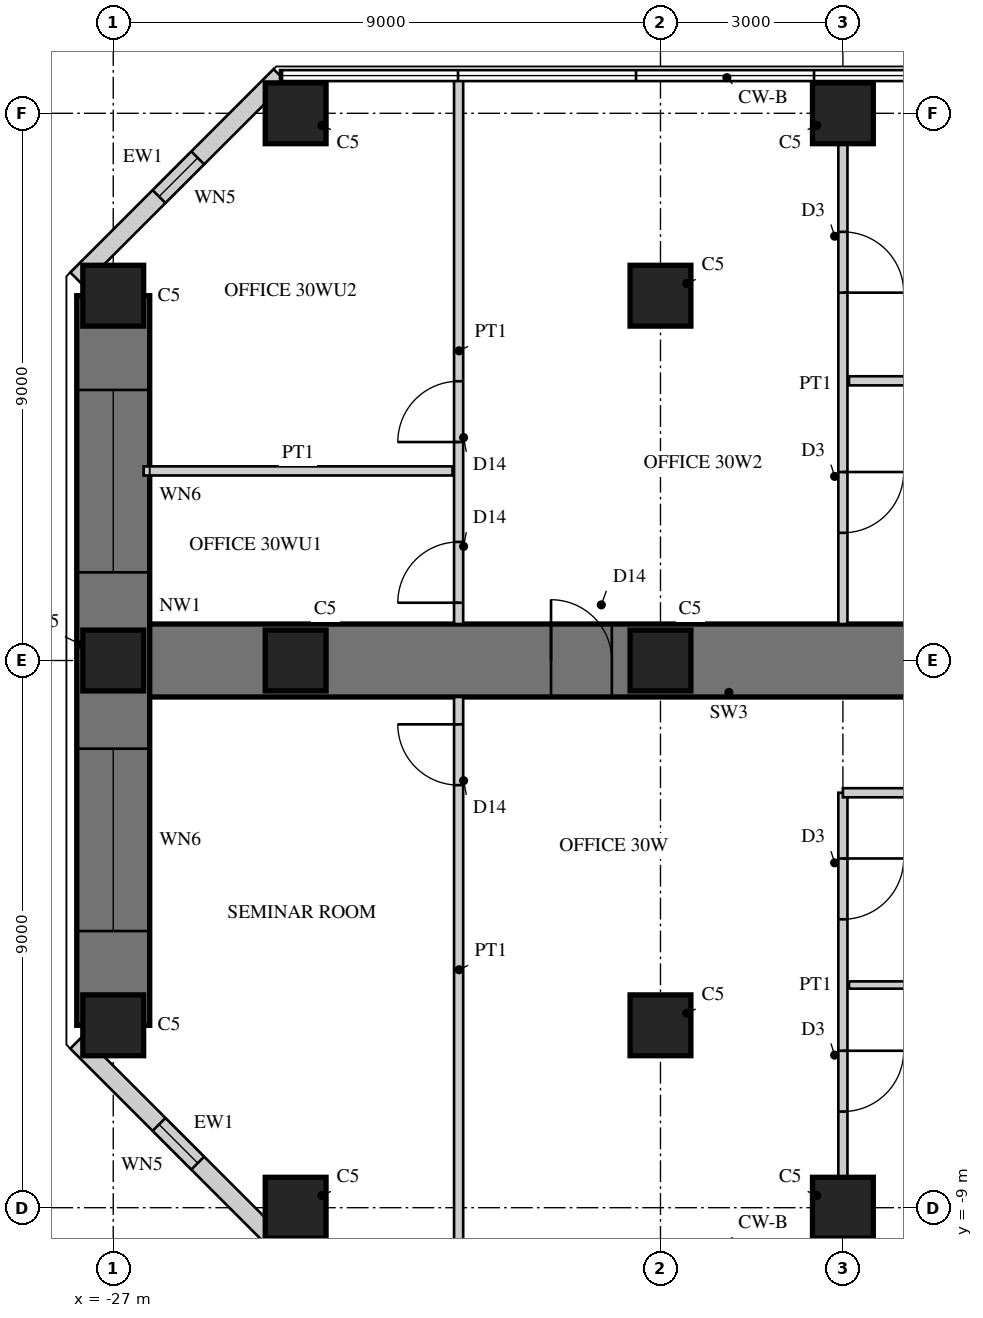
"""IFC4 building model, lengths in metres.
Left out: names, types, materials, properties, quantities, classifications, styles, units other than length and angle.
Written with IfcOpenShell. Run it as: python <this file> out.ifc"""

import sys

from ifc_helpers import new_model, si_unit, direction, frame, frame_2d, origin, origin_2d, place, context, subcontext, project, spatial, rectangle, hollow_rectangle, extrude, element, fill, save


model = new_model("IFC4")
c1 = context("Model", 3, precision=1e-05, world=origin(), true_north=direction((0.0, 1.0)))
c2 = subcontext(c1, "Body", "Model", "MODEL_VIEW")
j1 = project(units=[si_unit("LENGTHUNIT", "METRE"), si_unit("PLANEANGLEUNIT", "RADIAN")], contexts=[c1])
p1 = place(None, origin())
s1 = spatial("IfcSite", under=j1, at=p1, CompositionType="ELEMENT")
p2 = place(p1, origin())
s2 = spatial("IfcBuilding", under=s1, at=p2, CompositionType="ELEMENT")
p3 = place(p2, frame((0.0, 0.0, 124.5)))
s3 = spatial("IfcBuildingStorey", under=s2, at=p3, CompositionType="ELEMENT", Elevation=124.5)
p4 = place(p3, frame((-9.0, 0.0, 0.0), z_axis=(0.0, 0.0, 1.0), x_axis=(-1.0, 0.0, 0.0)))
e1 = element("IfcWall", 1, at=p4, inside=s3, PredefinedType="SHEAR", context=c2, shape_type="SweptSolid", body=[
    extrude(rectangle(XDim=18.0, YDim=1.2, at=frame_2d((9.0, 0.0))), origin(), (0.0, 0.0, 1.0), 4.0),
])
p5 = place(p4, frame((9.8, 0.0, 0.0)))
e2 = element("IfcOpeningElement", 2, at=p5, cuts=e1, PredefinedType="OPENING", context=c2, shape_type="SweptSolid", body=[
    extrude(rectangle(XDim=1.0, YDim=2.2, at=frame_2d((0.5, 1.1))), frame((0.0, 0.61, 0.0), z_axis=(0.0, -1.0, 0.0), x_axis=(1.0, 0.0, 0.0)), (0.0, 0.0, 1.0), 1.22),
])
p6 = place(p3, frame((-27.0, 6.0, 0.0), z_axis=(0.0, 0.0, 1.0), x_axis=(0.0, -1.0, 0.0)))
e3 = element("IfcWall", 3, at=p6, inside=s3, PredefinedType="SHEAR", context=c2, shape_type="SweptSolid", body=[
    extrude(rectangle(XDim=12.0, YDim=1.2, at=frame_2d((6.0, 0.0))), origin(), (0.0, 0.0, 1.0), 4.0),
])
p7 = place(p6, frame((1.55, 0.0, 0.6)))
e4 = element("IfcOpeningElement", 4, at=p7, cuts=e3, PredefinedType="OPENING", context=c2, shape_type="SweptSolid", body=[
    extrude(rectangle(XDim=3.0, YDim=2.4, at=frame_2d((1.5, 1.2))), frame((0.0, 0.61, 0.0), z_axis=(0.0, -1.0, 0.0), x_axis=(1.0, 0.0, 0.0)), (0.0, 0.0, 1.0), 1.22),
])
p8 = place(p6, frame((7.45, 0.0, 0.6)))
e5 = element("IfcOpeningElement", 5, at=p8, cuts=e3, PredefinedType="OPENING", context=c2, shape_type="SweptSolid", body=[
    extrude(rectangle(XDim=3.0, YDim=2.4, at=frame_2d((1.5, 1.2))), frame((0.0, 0.61, 0.0), z_axis=(0.0, -1.0, 0.0), x_axis=(1.0, 0.0, 0.0)), (0.0, 0.0, 1.0), 1.22),
])
for number, where, z_axis, x_axis in (
    (6, (-15.0, 9.0, 0.0), (0.0, 0.0, 1.0), (1.0, 0.0, 0.0)),
    (7, (-24.0, 9.0, 0.0), (0.0, 0.0, 1.0), (1.0, 0.0, 0.0)),
    (8, (-15.0, -9.0, 0.0), (0.0, 0.0, 1.0), (1.0, 0.0, 0.0)),
    (9, (-24.0, -9.0, 0.0), (0.0, 0.0, 1.0), (1.0, 0.0, 0.0)),
    (10, (-27.0, 6.0, 0.0), (0.0, 0.0, 1.0), (1.0, 0.0, 0.0)),
    (11, (-27.0, 0.0, 0.0), (0.0, 0.0, 1.0), (1.0, 0.0, 0.0)),
    (12, (-27.0, -6.0, 0.0), (0.0, 0.0, 1.0), (1.0, 0.0, 0.0)),
    (13, (-18.0, 6.0, 0.0), (0.0, 0.0, 1.0), (1.0, 0.0, 0.0)),
    (14, (-18.0, 0.0, 0.0), (0.0, 0.0, 1.0), (1.0, 0.0, 0.0)),
    (15, (-18.0, -6.0, 0.0), (0.0, 0.0, 1.0), (1.0, 0.0, 0.0)),
    (16, (-24.0, 0.0, 0.0), (0.0, 0.0, 1.0), (1.0, 0.0, 0.0)),
):
    element("IfcColumn", number, at=place(p3, frame(where, z_axis=z_axis, x_axis=x_axis)), inside=s3, PredefinedType="COLUMN", context=c2, shape_type="SweptSolid", body=[
        extrude(rectangle(XDim=1.0, YDim=1.0, at=origin_2d()), origin(), (0.0, 0.0, 1.0), 4.0),
    ])
p9 = place(p3, frame((-24.257, 9.62, 0.0), z_axis=(0.0, 0.0, 1.0), x_axis=(-0.707106781187, -0.707106781187, 0.0)))
e17 = element("IfcWall", 17, at=p9, inside=s3, PredefinedType="SOLIDWALL", context=c2, shape_type="SweptSolid", body=[
    extrude(rectangle(XDim=4.728, YDim=0.3, at=frame_2d((2.364, 0.0))), origin(), (0.0, 0.0, 1.0), 3.8),
])
p10 = place(p9, frame((1.914, 0.0, 0.3)))
e18 = element("IfcOpeningElement", 18, at=p10, cuts=e17, PredefinedType="OPENING", context=c2, shape_type="SweptSolid", body=[
    extrude(rectangle(XDim=0.9, YDim=2.4, at=frame_2d((0.45, 1.2))), frame((0.0, 0.16, 0.0), z_axis=(0.0, -1.0, 0.0), x_axis=(1.0, 0.0, 0.0)), (0.0, 0.0, 1.0), 0.32),
])
p11 = place(p3, frame((-27.6, -6.277, 0.0), z_axis=(0.0, 0.0, 1.0), x_axis=(0.707106781187, -0.707106781187, 0.0)))
e19 = element("IfcWall", 19, at=p11, inside=s3, PredefinedType="SOLIDWALL", context=c2, shape_type="SweptSolid", body=[
    extrude(rectangle(XDim=4.728, YDim=0.3, at=frame_2d((2.364, 0.0))), origin(), (0.0, 0.0, 1.0), 3.8),
])
p12 = place(p11, frame((1.914, 0.0, 0.3)))
e20 = element("IfcOpeningElement", 20, at=p12, cuts=e19, PredefinedType="OPENING", context=c2, shape_type="SweptSolid", body=[
    extrude(rectangle(XDim=0.9, YDim=2.4, at=frame_2d((0.45, 1.2))), frame((0.0, 0.16, 0.0), z_axis=(0.0, -1.0, 0.0), x_axis=(1.0, 0.0, 0.0)), (0.0, 0.0, 1.0), 0.32),
])
p13 = place(p3, frame((-15.0, -2.175, 0.0), z_axis=(0.0, 0.0, 1.0), x_axis=(0.0, -1.0, 0.0)))
e21 = element("IfcWall", 21, at=p13, inside=s3, PredefinedType="PARTITIONING", context=c2, shape_type="SweptSolid", body=[
    extrude(rectangle(XDim=6.325, YDim=0.15, at=frame_2d((3.163, 0.0))), origin(), (0.0, 0.0, 1.0), 3.0),
])
p14 = place(p13, frame((1.081, 0.0, 0.0)))
e22 = element("IfcOpeningElement", 22, at=p14, cuts=e21, PredefinedType="OPENING", context=c2, shape_type="SweptSolid", body=[
    extrude(rectangle(XDim=1.0, YDim=2.1, at=frame_2d((0.5, 1.05))), frame((0.0, 0.085, 0.0), z_axis=(0.0, -1.0, 0.0), x_axis=(1.0, 0.0, 0.0)), (0.0, 0.0, 1.0), 0.17),
])
p15 = place(p13, frame((4.244, 0.0, 0.0)))
e23 = element("IfcOpeningElement", 23, at=p15, cuts=e21, PredefinedType="OPENING", context=c2, shape_type="SweptSolid", body=[
    extrude(rectangle(XDim=1.0, YDim=2.1, at=frame_2d((0.5, 1.05))), frame((0.0, 0.085, 0.0), z_axis=(0.0, -1.0, 0.0), x_axis=(1.0, 0.0, 0.0)), (0.0, 0.0, 1.0), 0.17),
])
p16 = place(p3, frame((-9.65, -2.175, 0.0), z_axis=(0.0, 0.0, 1.0), x_axis=(-1.0, 0.0, 0.0)))
e24 = element("IfcWall", 24, at=p16, inside=s3, PredefinedType="PARTITIONING", context=c2, shape_type="SweptSolid", body=[
    extrude(rectangle(XDim=5.35, YDim=0.15, at=frame_2d((2.675, 0.0))), origin(), (0.0, 0.0, 1.0), 3.8),
])
p17 = place(p3, frame((-9.65, -5.337, 0.0), z_axis=(0.0, 0.0, 1.0), x_axis=(-1.0, 0.0, 0.0)))
e25 = element("IfcWall", 25, at=p17, inside=s3, PredefinedType="PLUMBINGWALL", context=c2, shape_type="SweptSolid", body=[
    extrude(rectangle(XDim=5.25, YDim=0.12, at=frame_2d((2.625, 0.0))), origin(), (0.0, 0.0, 1.0), 3.8),
])
p18 = place(p3, frame((-15.0, 8.5, 0.0), z_axis=(0.0, 0.0, 1.0), x_axis=(0.0, -1.0, 0.0)))
e26 = element("IfcWall", 26, at=p18, inside=s3, PredefinedType="PARTITIONING", context=c2, shape_type="SweptSolid", body=[
    extrude(rectangle(XDim=7.9, YDim=0.15, at=frame_2d((3.95, 0.0))), origin(), (0.0, 0.0, 1.0), 3.0),
])
p19 = place(p18, frame((1.45, 0.0, 0.0)))
e27 = element("IfcOpeningElement", 27, at=p19, cuts=e26, PredefinedType="OPENING", context=c2, shape_type="SweptSolid", body=[
    extrude(rectangle(XDim=1.0, YDim=2.1, at=frame_2d((0.5, 1.05))), frame((0.0, 0.085, 0.0), z_axis=(0.0, -1.0, 0.0), x_axis=(1.0, 0.0, 0.0)), (0.0, 0.0, 1.0), 0.17),
])
p20 = place(p18, frame((5.4, 0.0, 0.0)))
e28 = element("IfcOpeningElement", 28, at=p20, cuts=e26, PredefinedType="OPENING", context=c2, shape_type="SweptSolid", body=[
    extrude(rectangle(XDim=1.0, YDim=2.1, at=frame_2d((0.5, 1.05))), frame((0.0, 0.085, 0.0), z_axis=(0.0, -1.0, 0.0), x_axis=(1.0, 0.0, 0.0)), (0.0, 0.0, 1.0), 0.17),
])
p21 = place(p3, frame((-9.65, 4.6, 0.0), z_axis=(0.0, 0.0, 1.0), x_axis=(-1.0, 0.0, 0.0)))
e29 = element("IfcWall", 29, at=p21, inside=s3, PredefinedType="PARTITIONING", context=c2, shape_type="SweptSolid", body=[
    extrude(rectangle(XDim=5.25, YDim=0.15, at=frame_2d((2.625, 0.0))), origin(), (0.0, 0.0, 1.0), 3.8),
])
p22 = place(p3, frame((-21.32, -0.6, 0.0), z_axis=(0.0, 0.0, 1.0), x_axis=(0.0, -1.0, 0.0)))
e30 = element("IfcWall", 30, at=p22, inside=s3, PredefinedType="PARTITIONING", context=c2, shape_type="SweptSolid", body=[
    extrude(rectangle(XDim=8.98, YDim=0.15, at=frame_2d((4.49, 0.0))), origin(), (0.0, 0.0, 1.0), 3.8),
])
p23 = place(p22, frame((0.45, 0.0, 0.0)))
e31 = element("IfcOpeningElement", 31, at=p23, cuts=e30, PredefinedType="OPENING", context=c2, shape_type="SweptSolid", body=[
    extrude(rectangle(XDim=1.0, YDim=2.2, at=frame_2d((0.5, 1.1))), frame((0.0, 0.085, 0.0), z_axis=(0.0, -1.0, 0.0), x_axis=(1.0, 0.0, 0.0)), (0.0, 0.0, 1.0), 0.17),
])
p24 = place(p3, frame((-21.42, 3.118, 0.0), z_axis=(0.0, 0.0, 1.0), x_axis=(-1.0, 0.0, 0.0)))
e32 = element("IfcWall", 32, at=p24, inside=s3, PredefinedType="PARTITIONING", context=c2, shape_type="SweptSolid", body=[
    extrude(rectangle(XDim=5.08, YDim=0.15, at=frame_2d((2.54, 0.0))), origin(), (0.0, 0.0, 1.0), 3.8),
])
p25 = place(p3, frame((-21.32, 9.58, 0.0), z_axis=(0.0, 0.0, 1.0), x_axis=(0.0, -1.0, 0.0)))
e33 = element("IfcWall", 33, at=p25, inside=s3, PredefinedType="PARTITIONING", context=c2, shape_type="SweptSolid", body=[
    extrude(rectangle(XDim=8.98, YDim=0.15, at=frame_2d((4.49, 0.0))), origin(), (0.0, 0.0, 1.0), 3.8),
])
p26 = place(p25, frame((4.987, 0.0, 0.0)))
e34 = element("IfcOpeningElement", 34, at=p26, cuts=e33, PredefinedType="OPENING", context=c2, shape_type="SweptSolid", body=[
    extrude(rectangle(XDim=1.0, YDim=2.2, at=frame_2d((0.5, 1.1))), frame((0.0, 0.085, 0.0), z_axis=(0.0, -1.0, 0.0), x_axis=(1.0, 0.0, 0.0)), (0.0, 0.0, 1.0), 0.17),
])
p27 = place(p25, frame((7.63, 0.0, 0.0)))
e35 = element("IfcOpeningElement", 35, at=p27, cuts=e33, PredefinedType="OPENING", context=c2, shape_type="SweptSolid", body=[
    extrude(rectangle(XDim=1.0, YDim=2.2, at=frame_2d((0.5, 1.1))), frame((0.0, 0.085, 0.0), z_axis=(0.0, -1.0, 0.0), x_axis=(1.0, 0.0, 0.0)), (0.0, 0.0, 1.0), 0.17),
])
p28 = place(p10, origin())
e36 = element("IfcWindow", 36, at=p28, inside=s3, PartitioningType="SINGLE_PANEL", PredefinedType="WINDOW", context=c2, shape_type="SweptSolid", body=[
    extrude(hollow_rectangle(XDim=0.9, YDim=2.4, WallThickness=0.06, at=frame_2d((0.45, 1.2))), frame((0.0, 0.03, 0.0), z_axis=(0.0, -1.0, 0.0), x_axis=(1.0, 0.0, 0.0)), (0.0, 0.0, 1.0), 0.06),
    extrude(rectangle(XDim=0.779, YDim=2.279, at=frame_2d((0.45, 1.2))), frame((0.0, 0.03, 0.0), z_axis=(0.0, -1.0, 0.0), x_axis=(1.0, 0.0, 0.0)), (0.0, 0.0, 1.0), 0.06),
])
fill(e18, e36)
p29 = place(p7, origin())
e37 = element("IfcWindow", 37, at=p29, inside=s3, PartitioningType="SINGLE_PANEL", PredefinedType="WINDOW", context=c2, shape_type="SweptSolid", body=[
    extrude(hollow_rectangle(XDim=3.0, YDim=2.4, WallThickness=0.06, at=frame_2d((1.5, 1.2))), frame((0.0, 0.03, 0.0), z_axis=(0.0, -1.0, 0.0), x_axis=(1.0, 0.0, 0.0)), (0.0, 0.0, 1.0), 0.06),
    extrude(rectangle(XDim=2.879, YDim=2.279, at=frame_2d((1.5, 1.2))), frame((0.0, 0.03, 0.0), z_axis=(0.0, -1.0, 0.0), x_axis=(1.0, 0.0, 0.0)), (0.0, 0.0, 1.0), 0.06),
])
fill(e4, e37)
p30 = place(p8, origin())
e38 = element("IfcWindow", 38, at=p30, inside=s3, PartitioningType="SINGLE_PANEL", PredefinedType="WINDOW", context=c2, shape_type="SweptSolid", body=[
    extrude(hollow_rectangle(XDim=3.0, YDim=2.4, WallThickness=0.06, at=frame_2d((1.5, 1.2))), frame((0.0, 0.03, 0.0), z_axis=(0.0, -1.0, 0.0), x_axis=(1.0, 0.0, 0.0)), (0.0, 0.0, 1.0), 0.06),
    extrude(rectangle(XDim=2.879, YDim=2.279, at=frame_2d((1.5, 1.2))), frame((0.0, 0.03, 0.0), z_axis=(0.0, -1.0, 0.0), x_axis=(1.0, 0.0, 0.0)), (0.0, 0.0, 1.0), 0.06),
])
fill(e5, e38)
p31 = place(p12, origin())
e39 = element("IfcWindow", 39, at=p31, inside=s3, PartitioningType="SINGLE_PANEL", PredefinedType="WINDOW", context=c2, shape_type="SweptSolid", body=[
    extrude(hollow_rectangle(XDim=0.9, YDim=2.4, WallThickness=0.06, at=frame_2d((0.45, 1.2))), frame((0.0, 0.03, 0.0), z_axis=(0.0, -1.0, 0.0), x_axis=(1.0, 0.0, 0.0)), (0.0, 0.0, 1.0), 0.06),
    extrude(rectangle(XDim=0.779, YDim=2.279, at=frame_2d((0.45, 1.2))), frame((0.0, 0.03, 0.0), z_axis=(0.0, -1.0, 0.0), x_axis=(1.0, 0.0, 0.0)), (0.0, 0.0, 1.0), 0.06),
])
fill(e20, e39)
p32 = place(p14, origin())
e40 = element("IfcDoor", 40, at=p32, inside=s3, OperationType="SINGLE_SWING_LEFT", PredefinedType="DOOR", context=c2, shape_type="SweptSolid", body=[
    extrude(rectangle(XDim=1.0, YDim=2.1, at=frame_2d((0.5, 1.05))), frame((0.0, 0.025, 0.0), z_axis=(0.0, -1.0, 0.0), x_axis=(1.0, 0.0, 0.0)), (0.0, 0.0, 1.0), 0.05),
])
fill(e22, e40)
p33 = place(p15, origin())
e41 = element("IfcDoor", 41, at=p33, inside=s3, OperationType="SINGLE_SWING_LEFT", PredefinedType="DOOR", context=c2, shape_type="SweptSolid", body=[
    extrude(rectangle(XDim=1.0, YDim=2.1, at=frame_2d((0.5, 1.05))), frame((0.0, 0.025, 0.0), z_axis=(0.0, -1.0, 0.0), x_axis=(1.0, 0.0, 0.0)), (0.0, 0.0, 1.0), 0.05),
])
fill(e23, e41)
p34 = place(p19, origin())
e42 = element("IfcDoor", 42, at=p34, inside=s3, OperationType="SINGLE_SWING_RIGHT", PredefinedType="DOOR", context=c2, shape_type="SweptSolid", body=[
    extrude(rectangle(XDim=1.0, YDim=2.1, at=frame_2d((0.5, 1.05))), frame((0.0, 0.025, 0.0), z_axis=(0.0, -1.0, 0.0), x_axis=(1.0, 0.0, 0.0)), (0.0, 0.0, 1.0), 0.05),
])
fill(e27, e42)
p35 = place(p20, origin())
e43 = element("IfcDoor", 43, at=p35, inside=s3, OperationType="SINGLE_SWING_LEFT", PredefinedType="DOOR", context=c2, shape_type="SweptSolid", body=[
    extrude(rectangle(XDim=1.0, YDim=2.1, at=frame_2d((0.5, 1.05))), frame((0.0, 0.025, 0.0), z_axis=(0.0, -1.0, 0.0), x_axis=(1.0, 0.0, 0.0)), (0.0, 0.0, 1.0), 0.05),
])
fill(e28, e43)
p36 = place(p23, frame((1.0, 0.0, 0.0), z_axis=(0.0, 0.0, 1.0), x_axis=(-1.0, 0.0, 0.0)))
e44 = element("IfcDoor", 44, at=p36, inside=s3, OperationType="SINGLE_SWING_RIGHT", PredefinedType="DOOR", context=c2, shape_type="SweptSolid", body=[
    extrude(rectangle(XDim=1.0, YDim=2.2, at=frame_2d((0.5, 1.1))), frame((0.0, 0.025, 0.0), z_axis=(0.0, -1.0, 0.0), x_axis=(1.0, 0.0, 0.0)), (0.0, 0.0, 1.0), 0.05),
])
fill(e31, e44)
p37 = place(p26, frame((1.0, 0.0, 0.0), z_axis=(0.0, 0.0, 1.0), x_axis=(-1.0, 0.0, 0.0)))
e45 = element("IfcDoor", 45, at=p37, inside=s3, OperationType="SINGLE_SWING_LEFT", PredefinedType="DOOR", context=c2, shape_type="SweptSolid", body=[
    extrude(rectangle(XDim=1.0, YDim=2.2, at=frame_2d((0.5, 1.1))), frame((0.0, 0.025, 0.0), z_axis=(0.0, -1.0, 0.0), x_axis=(1.0, 0.0, 0.0)), (0.0, 0.0, 1.0), 0.05),
])
fill(e34, e45)
p38 = place(p27, frame((1.0, 0.0, 0.0), z_axis=(0.0, 0.0, 1.0), x_axis=(-1.0, 0.0, 0.0)))
e46 = element("IfcDoor", 46, at=p38, inside=s3, OperationType="SINGLE_SWING_LEFT", PredefinedType="DOOR", context=c2, shape_type="SweptSolid", body=[
    extrude(rectangle(XDim=1.0, YDim=2.2, at=frame_2d((0.5, 1.1))), frame((0.0, 0.025, 0.0), z_axis=(0.0, -1.0, 0.0), x_axis=(1.0, 0.0, 0.0)), (0.0, 0.0, 1.0), 0.05),
])
fill(e35, e46)
p39 = place(p5, frame((1.0, 0.0, 0.0), z_axis=(0.0, 0.0, 1.0), x_axis=(-1.0, 0.0, 0.0)))
e47 = element("IfcDoor", 47, at=p39, inside=s3, OperationType="SINGLE_SWING_LEFT", PredefinedType="DOOR", context=c2, shape_type="SweptSolid", body=[
    extrude(rectangle(XDim=1.0, YDim=2.2, at=frame_2d((0.5, 1.1))), frame((0.0, 0.025, 0.0), z_axis=(0.0, -1.0, 0.0), x_axis=(1.0, 0.0, 0.0)), (0.0, 0.0, 1.0), 0.05),
])
fill(e2, e47)
save(model, sys.argv[1])
